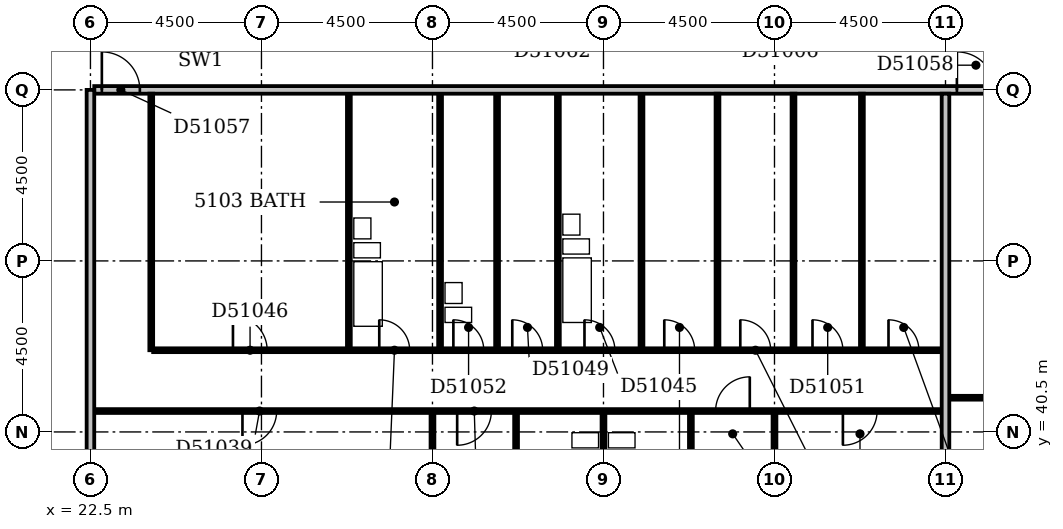
"""IFC4 building model, lengths in metres.
Left out: names, types, materials, properties, quantities, classifications, styles, units other than length and angle.
Written with IfcOpenShell. Run it as: python <this file> out.ifc"""

import sys

from ifc_helpers import new_model, si_unit, direction, frame, frame_2d, origin, place, context, subcontext, project, spatial, rectangle, extrude, element, fill, save


model = new_model("IFC4")
c1 = context("Model", 3, precision=1e-05, world=origin(), true_north=direction((0.0, 1.0)))
c2 = subcontext(c1, "Body", "Model", "MODEL_VIEW")
j1 = project(units=[si_unit("LENGTHUNIT", "METRE"), si_unit("PLANEANGLEUNIT", "RADIAN")], contexts=[c1])
p1 = place(None, origin())
s1 = spatial("IfcSite", under=j1, at=p1, CompositionType="ELEMENT")
p2 = place(p1, origin())
s2 = spatial("IfcBuilding", under=s1, at=p2, CompositionType="ELEMENT")
p3 = place(p2, frame((0.0, 0.0, 200.6)))
s3 = spatial("IfcBuildingStorey", under=s2, at=p3, CompositionType="ELEMENT", Elevation=200.6)
p4 = place(p3, frame((22.5, 36.45, 0.0), z_axis=(0.0, 0.0, 1.0), x_axis=(0.0, 1.0, 0.0)))
e1 = element("IfcWall", 1, at=p4, inside=s3, PredefinedType="PARTITIONING", context=c2, shape_type="SweptSolid", body=[
    extrude(rectangle(XDim=13.05, YDim=0.2, at=frame_2d((6.525, 0.0))), origin(), (0.0, 0.0, 1.0), 3.3),
])
p5 = place(p3, frame((31.5, 36.45, 0.0), z_axis=(0.0, 0.0, 1.0), x_axis=(0.0, 1.0, 0.0)))
e2 = element("IfcWall", 2, at=p5, inside=s3, PredefinedType="PARTITIONING", context=c2, shape_type="SweptSolid", body=[
    extrude(rectangle(XDim=4.55, YDim=0.1, at=frame_2d((2.275, 0.0))), origin(), (0.0, 0.0, 1.0), 3.3),
])
p6 = place(p3, frame((36.0, 36.45, 0.0), z_axis=(0.0, 0.0, 1.0), x_axis=(0.0, 1.0, 0.0)))
e3 = element("IfcWall", 3, at=p6, inside=s3, PredefinedType="PARTITIONING", context=c2, shape_type="SweptSolid", body=[
    extrude(rectangle(XDim=4.55, YDim=0.1, at=frame_2d((2.275, 0.0))), origin(), (0.0, 0.0, 1.0), 2.4),
])
p7 = place(p3, frame((40.5, 36.45, 0.0), z_axis=(0.0, 0.0, 1.0), x_axis=(0.0, 1.0, 0.0)))
e4 = element("IfcWall", 4, at=p7, inside=s3, PredefinedType="PARTITIONING", context=c2, shape_type="SweptSolid", body=[
    extrude(rectangle(XDim=4.55, YDim=0.1, at=frame_2d((2.275, 0.0))), origin(), (0.0, 0.0, 1.0), 3.3),
])
p8 = place(p3, frame((45.0, 36.45, 0.0), z_axis=(0.0, 0.0, 1.0), x_axis=(0.0, 1.0, 0.0)))
e5 = element("IfcWall", 5, at=p8, inside=s3, PredefinedType="PARTITIONING", context=c2, shape_type="SweptSolid", body=[
    extrude(rectangle(XDim=12.95, YDim=0.2, at=frame_2d((6.475, 0.0))), origin(), (0.0, 0.0, 1.0), 2.6),
])
p9 = place(p3, frame((33.7, 38.15, 0.0), z_axis=(0.0, 0.0, 1.0), x_axis=(0.0, 1.0, 0.0)))
e6 = element("IfcWall", 6, at=p9, inside=s3, PredefinedType="PLUMBINGWALL", context=c2, shape_type="SweptSolid", body=[
    extrude(rectangle(XDim=2.85, YDim=0.1, at=frame_2d((1.425, 0.0))), origin(), (0.0, 0.0, 1.0), 3.3),
])
p10 = place(p9, frame((1.05, 0.0, 0.0)))
e7 = element("IfcOpeningElement", 7, at=p10, cuts=e6, PredefinedType="OPENING", context=c2, shape_type="SweptSolid", body=[
    extrude(rectangle(XDim=0.8, YDim=2.1, at=frame_2d((0.4, 1.05))), frame((0.0, 0.062, 0.0), z_axis=(0.0, -1.0, 0.0), x_axis=(1.0, 0.0, 0.0)), (0.0, 0.0, 1.0), 0.124),
])
p11 = place(p3, frame((38.3, 38.15, 0.0), z_axis=(0.0, 0.0, 1.0), x_axis=(0.0, 1.0, 0.0)))
e8 = element("IfcWall", 8, at=p11, inside=s3, PredefinedType="PLUMBINGWALL", context=c2, shape_type="SweptSolid", body=[
    extrude(rectangle(XDim=2.85, YDim=0.1, at=frame_2d((1.425, 0.0))), origin(), (0.0, 0.0, 1.0), 3.3),
])
p12 = place(p11, frame((1.05, 0.0, 0.0)))
e9 = element("IfcOpeningElement", 9, at=p12, cuts=e8, PredefinedType="OPENING", context=c2, shape_type="SweptSolid", body=[
    extrude(rectangle(XDim=0.8, YDim=2.1, at=frame_2d((0.4, 1.05))), frame((0.0, 0.062, 0.0), z_axis=(0.0, -1.0, 0.0), x_axis=(1.0, 0.0, 0.0)), (0.0, 0.0, 1.0), 0.124),
])
p13 = place(p3, frame((22.6, 41.05, 0.0), z_axis=(0.0, 0.0, 1.0), x_axis=(1.0, 0.0, 0.0)))
e10 = element("IfcWall", 10, at=p13, inside=s3, PredefinedType="PARTITIONING", context=c2, shape_type="SweptSolid", body=[
    extrude(rectangle(XDim=22.3, YDim=0.1, at=frame_2d((11.15, 0.0))), origin(), (0.0, 0.0, 1.0), 3.3),
])
p14 = place(p13, frame((3.9, 0.0, 0.0)))
e11 = element("IfcOpeningElement", 11, at=p14, cuts=e10, PredefinedType="OPENING", context=c2, shape_type="SweptSolid", body=[
    extrude(rectangle(XDim=0.9, YDim=2.1, at=frame_2d((0.45, 1.05))), frame((0.0, 0.062, 0.0), z_axis=(0.0, -1.0, 0.0), x_axis=(1.0, 0.0, 0.0)), (0.0, 0.0, 1.0), 0.124),
])
p15 = place(p13, frame((9.55, 0.0, 0.0)))
e12 = element("IfcOpeningElement", 12, at=p15, cuts=e10, PredefinedType="OPENING", context=c2, shape_type="SweptSolid", body=[
    extrude(rectangle(XDim=0.9, YDim=2.1, at=frame_2d((0.45, 1.05))), frame((0.0, 0.062, 0.0), z_axis=(0.0, -1.0, 0.0), x_axis=(1.0, 0.0, 0.0)), (0.0, 0.0, 1.0), 0.124),
])
p16 = place(p13, frame((16.35, 0.0, 0.0)))
e13 = element("IfcOpeningElement", 13, at=p16, cuts=e10, PredefinedType="OPENING", context=c2, shape_type="SweptSolid", body=[
    extrude(rectangle(XDim=0.9, YDim=2.1, at=frame_2d((0.45, 1.05))), frame((0.0, 0.062, 0.0), z_axis=(0.0, -1.0, 0.0), x_axis=(1.0, 0.0, 0.0)), (0.0, 0.0, 1.0), 0.124),
])
p17 = place(p13, frame((19.7, 0.0, 0.0)))
e14 = element("IfcOpeningElement", 14, at=p17, cuts=e10, PredefinedType="OPENING", context=c2, shape_type="SweptSolid", body=[
    extrude(rectangle(XDim=0.9, YDim=2.1, at=frame_2d((0.45, 1.05))), frame((0.0, 0.062, 0.0), z_axis=(0.0, -1.0, 0.0), x_axis=(1.0, 0.0, 0.0)), (0.0, 0.0, 1.0), 0.124),
])
p18 = place(p3, frame((45.1, 41.4, 0.0), z_axis=(0.0, 0.0, 1.0), x_axis=(1.0, 0.0, 0.0)))
e15 = element("IfcWall", 15, at=p18, inside=s3, PredefinedType="PARTITIONING", context=c2, shape_type="SweptSolid", body=[
    extrude(rectangle(XDim=9.5, YDim=0.1, at=frame_2d((4.75, 0.0))), origin(), (0.0, 0.0, 1.0), 3.3),
])
p19 = place(p18, frame((3.95, 0.0, 0.0)))
e16 = element("IfcOpeningElement", 16, at=p19, cuts=e15, PredefinedType="OPENING", context=c2, shape_type="SweptSolid", body=[
    extrude(rectangle(XDim=0.9, YDim=2.1, at=frame_2d((0.45, 1.05))), frame((0.0, 0.062, 0.0), z_axis=(0.0, -1.0, 0.0), x_axis=(1.0, 0.0, 0.0)), (0.0, 0.0, 1.0), 0.124),
])
p20 = place(p3, frame((24.1, 42.65, 0.0), z_axis=(0.0, 0.0, 1.0), x_axis=(0.0, 1.0, 0.0)))
e17 = element("IfcWall", 17, at=p20, inside=s3, PredefinedType="PARTITIONING", context=c2, shape_type="SweptSolid", body=[
    extrude(rectangle(XDim=6.75, YDim=0.1, at=frame_2d((3.375, 0.0))), origin(), (0.0, 0.0, 1.0), 3.3),
])
p21 = place(p3, frame((24.15, 42.65, 0.0), z_axis=(0.0, 0.0, 1.0), x_axis=(1.0, 0.0, 0.0)))
e18 = element("IfcWall", 18, at=p21, inside=s3, PredefinedType="PARTITIONING", context=c2, shape_type="SweptSolid", body=[
    extrude(rectangle(XDim=20.75, YDim=0.1, at=frame_2d((10.375, 0.0))), origin(), (0.0, 0.0, 1.0), 3.3),
])
p22 = place(p21, frame((5.95, 0.0, 0.0)))
e19 = element("IfcOpeningElement", 19, at=p22, cuts=e18, PredefinedType="OPENING", context=c2, shape_type="SweptSolid", body=[
    extrude(rectangle(XDim=0.8, YDim=2.1, at=frame_2d((0.4, 1.05))), frame((0.0, 0.062, 0.0), z_axis=(0.0, -1.0, 0.0), x_axis=(1.0, 0.0, 0.0)), (0.0, 0.0, 1.0), 0.124),
])
p23 = place(p21, frame((11.35, 0.0, 0.0)))
e20 = element("IfcOpeningElement", 20, at=p23, cuts=e18, PredefinedType="OPENING", context=c2, shape_type="SweptSolid", body=[
    extrude(rectangle(XDim=0.8, YDim=2.1, at=frame_2d((0.4, 1.05))), frame((0.0, 0.062, 0.0), z_axis=(0.0, -1.0, 0.0), x_axis=(1.0, 0.0, 0.0)), (0.0, 0.0, 1.0), 0.124),
])
p24 = place(p21, frame((2.1, 0.0, 0.0)))
e21 = element("IfcOpeningElement", 21, at=p24, cuts=e18, PredefinedType="OPENING", context=c2, shape_type="SweptSolid", body=[
    extrude(rectangle(XDim=0.9, YDim=2.1, at=frame_2d((0.45, 1.05))), frame((0.0, 0.062, 0.0), z_axis=(0.0, -1.0, 0.0), x_axis=(1.0, 0.0, 0.0)), (0.0, 0.0, 1.0), 0.124),
])
p25 = place(p21, frame((19.35, 0.0, 0.0)))
e22 = element("IfcOpeningElement", 22, at=p25, cuts=e18, PredefinedType="OPENING", context=c2, shape_type="SweptSolid", body=[
    extrude(rectangle(XDim=0.8, YDim=2.1, at=frame_2d((0.4, 1.05))), frame((0.0, 0.062, 0.0), z_axis=(0.0, -1.0, 0.0), x_axis=(1.0, 0.0, 0.0)), (0.0, 0.0, 1.0), 0.124),
])
p26 = place(p21, frame((15.45, 0.0, 0.0)))
e23 = element("IfcOpeningElement", 23, at=p26, cuts=e18, PredefinedType="OPENING", context=c2, shape_type="SweptSolid", body=[
    extrude(rectangle(XDim=0.8, YDim=2.1, at=frame_2d((0.4, 1.05))), frame((0.0, 0.062, 0.0), z_axis=(0.0, -1.0, 0.0), x_axis=(1.0, 0.0, 0.0)), (0.0, 0.0, 1.0), 0.124),
])
p27 = place(p21, frame((9.45, 0.0, 0.0)))
e24 = element("IfcOpeningElement", 24, at=p27, cuts=e18, PredefinedType="OPENING", context=c2, shape_type="SweptSolid", body=[
    extrude(rectangle(XDim=0.8, YDim=2.1, at=frame_2d((0.4, 1.05))), frame((0.0, 0.062, 0.0), z_axis=(0.0, -1.0, 0.0), x_axis=(1.0, 0.0, 0.0)), (0.0, 0.0, 1.0), 0.124),
])
p28 = place(p21, frame((13.45, 0.0, 0.0)))
e25 = element("IfcOpeningElement", 25, at=p28, cuts=e18, PredefinedType="OPENING", context=c2, shape_type="SweptSolid", body=[
    extrude(rectangle(XDim=0.8, YDim=2.1, at=frame_2d((0.4, 1.05))), frame((0.0, 0.062, 0.0), z_axis=(0.0, -1.0, 0.0), x_axis=(1.0, 0.0, 0.0)), (0.0, 0.0, 1.0), 0.124),
])
p29 = place(p21, frame((17.35, 0.0, 0.0)))
e26 = element("IfcOpeningElement", 26, at=p29, cuts=e18, PredefinedType="OPENING", context=c2, shape_type="SweptSolid", body=[
    extrude(rectangle(XDim=0.8, YDim=2.1, at=frame_2d((0.4, 1.05))), frame((0.0, 0.062, 0.0), z_axis=(0.0, -1.0, 0.0), x_axis=(1.0, 0.0, 0.0)), (0.0, 0.0, 1.0), 0.124),
])
p30 = place(p21, frame((7.9, 0.0, 0.0)))
e27 = element("IfcOpeningElement", 27, at=p30, cuts=e18, PredefinedType="OPENING", context=c2, shape_type="SweptSolid", body=[
    extrude(rectangle(XDim=0.8, YDim=2.1, at=frame_2d((0.4, 1.05))), frame((0.0, 0.062, 0.0), z_axis=(0.0, -1.0, 0.0), x_axis=(1.0, 0.0, 0.0)), (0.0, 0.0, 1.0), 0.124),
])
for number, where, z_axis, x_axis in (
    (28, (29.3, 42.7, 0.0), (0.0, 0.0, 1.0), (0.0, 1.0, 0.0)),
    (29, (31.7, 42.7, 0.0), (0.0, 0.0, 1.0), (0.0, 1.0, 0.0)),
    (30, (33.2, 42.7, 0.0), (0.0, 0.0, 1.0), (0.0, 1.0, 0.0)),
    (31, (34.8, 42.7, 0.0), (0.0, 0.0, 1.0), (0.0, 1.0, 0.0)),
    (32, (37.0, 42.7, 0.0), (0.0, 0.0, 1.0), (0.0, 1.0, 0.0)),
):
    element("IfcWall", number, at=place(p3, frame(where, z_axis=z_axis, x_axis=x_axis)), inside=s3, PredefinedType="PLUMBINGWALL", context=c2, shape_type="SweptSolid", body=[
        extrude(rectangle(XDim=6.7, YDim=0.1, at=frame_2d((3.35, 0.0))), origin(), (0.0, 0.0, 1.0), 3.3),
    ])
for number, where, z_axis, x_axis in (
    (33, (39.0, 42.7, 0.0), (0.0, 0.0, 1.0), (0.0, 1.0, 0.0)),
    (34, (41.0, 42.7, 0.0), (0.0, 0.0, 1.0), (0.0, 1.0, 0.0)),
    (35, (42.8, 42.7, 0.0), (0.0, 0.0, 1.0), (0.0, 1.0, 0.0)),
):
    element("IfcWall", number, at=place(p3, frame(where, z_axis=z_axis, x_axis=x_axis)), inside=s3, PredefinedType="PARTITIONING", context=c2, shape_type="SweptSolid", body=[
        extrude(rectangle(XDim=6.7, YDim=0.1, at=frame_2d((3.35, 0.0))), origin(), (0.0, 0.0, 1.0), 3.3),
    ])
p31 = place(p3, frame((22.6, 49.5, 0.0), z_axis=(0.0, 0.0, 1.0), x_axis=(1.0, 0.0, 0.0)))
e36 = element("IfcWall", 36, at=p31, inside=s3, PredefinedType="PARTITIONING", context=c2, shape_type="SweptSolid", body=[
    extrude(rectangle(XDim=30.95, YDim=0.2, at=frame_2d((15.475, 0.0))), origin(), (0.0, 0.0, 1.0), 3.3),
])
p32 = place(p31, frame((0.2, 0.0, 0.0)))
e37 = element("IfcOpeningElement", 37, at=p32, cuts=e36, PredefinedType="OPENING", context=c2, shape_type="SweptSolid", body=[
    extrude(rectangle(XDim=1.0, YDim=2.1, at=frame_2d((0.5, 1.05))), frame((0.0, 0.112, 0.0), z_axis=(0.0, -1.0, 0.0), x_axis=(1.0, 0.0, 0.0)), (0.0, 0.0, 1.0), 0.224),
])
p33 = place(p31, frame((22.7, 0.0, 0.0)))
e38 = element("IfcOpeningElement", 38, at=p33, cuts=e36, PredefinedType="OPENING", context=c2, shape_type="SweptSolid", body=[
    extrude(rectangle(XDim=1.0, YDim=2.1, at=frame_2d((0.5, 1.05))), frame((0.0, 0.112, 0.0), z_axis=(0.0, -1.0, 0.0), x_axis=(1.0, 0.0, 0.0)), (0.0, 0.0, 1.0), 0.224),
])
p34 = place(p14, frame((0.9, 0.0, 0.0), z_axis=(0.0, 0.0, 1.0), x_axis=(-1.0, 0.0, 0.0)))
e39 = element("IfcDoor", 39, at=p34, inside=s3, OperationType="SINGLE_SWING_RIGHT", PredefinedType="DOOR", context=c2, shape_type="SweptSolid", body=[
    extrude(rectangle(XDim=0.9, YDim=2.1, at=frame_2d((0.45, 1.05))), frame((0.0, 0.025, 0.0), z_axis=(0.0, -1.0, 0.0), x_axis=(1.0, 0.0, 0.0)), (0.0, 0.0, 1.0), 0.05),
])
fill(e11, e39)
p35 = place(p15, frame((0.9, 0.0, 0.0), z_axis=(0.0, 0.0, 1.0), x_axis=(-1.0, 0.0, 0.0)))
e40 = element("IfcDoor", 40, at=p35, inside=s3, OperationType="SINGLE_SWING_RIGHT", PredefinedType="DOOR", context=c2, shape_type="SweptSolid", body=[
    extrude(rectangle(XDim=0.9, YDim=2.1, at=frame_2d((0.45, 1.05))), frame((0.0, 0.025, 0.0), z_axis=(0.0, -1.0, 0.0), x_axis=(1.0, 0.0, 0.0)), (0.0, 0.0, 1.0), 0.05),
])
fill(e12, e40)
p36 = place(p16, frame((0.9, 0.0, 0.0), z_axis=(0.0, 0.0, 1.0), x_axis=(-1.0, 0.0, 0.0)))
e41 = element("IfcDoor", 41, at=p36, inside=s3, OperationType="SINGLE_SWING_LEFT", PredefinedType="DOOR", context=c2, shape_type="SweptSolid", body=[
    extrude(rectangle(XDim=0.9, YDim=2.1, at=frame_2d((0.45, 1.05))), frame((0.0, 0.025, 0.0), z_axis=(0.0, -1.0, 0.0), x_axis=(1.0, 0.0, 0.0)), (0.0, 0.0, 1.0), 0.05),
])
fill(e13, e41)
p37 = place(p17, frame((0.9, 0.0, 0.0), z_axis=(0.0, 0.0, 1.0), x_axis=(-1.0, 0.0, 0.0)))
e42 = element("IfcDoor", 42, at=p37, inside=s3, OperationType="SINGLE_SWING_RIGHT", PredefinedType="DOOR", context=c2, shape_type="SweptSolid", body=[
    extrude(rectangle(XDim=0.9, YDim=2.1, at=frame_2d((0.45, 1.05))), frame((0.0, 0.025, 0.0), z_axis=(0.0, -1.0, 0.0), x_axis=(1.0, 0.0, 0.0)), (0.0, 0.0, 1.0), 0.05),
])
fill(e14, e42)
p38 = place(p22, origin())
e43 = element("IfcDoor", 43, at=p38, inside=s3, OperationType="SINGLE_SWING_LEFT", PredefinedType="DOOR", context=c2, shape_type="SweptSolid", body=[
    extrude(rectangle(XDim=0.8, YDim=2.1, at=frame_2d((0.4, 1.05))), frame((0.0, 0.025, 0.0), z_axis=(0.0, -1.0, 0.0), x_axis=(1.0, 0.0, 0.0)), (0.0, 0.0, 1.0), 0.05),
])
fill(e19, e43)
p39 = place(p23, origin())
e44 = element("IfcDoor", 44, at=p39, inside=s3, OperationType="SINGLE_SWING_LEFT", PredefinedType="DOOR", context=c2, shape_type="SweptSolid", body=[
    extrude(rectangle(XDim=0.8, YDim=2.1, at=frame_2d((0.4, 1.05))), frame((0.0, 0.025, 0.0), z_axis=(0.0, -1.0, 0.0), x_axis=(1.0, 0.0, 0.0)), (0.0, 0.0, 1.0), 0.05),
])
fill(e20, e44)
p40 = place(p24, origin())
e45 = element("IfcDoor", 45, at=p40, inside=s3, OperationType="SINGLE_SWING_LEFT", PredefinedType="DOOR", context=c2, shape_type="SweptSolid", body=[
    extrude(rectangle(XDim=0.9, YDim=2.1, at=frame_2d((0.45, 1.05))), frame((0.0, 0.025, 0.0), z_axis=(0.0, -1.0, 0.0), x_axis=(1.0, 0.0, 0.0)), (0.0, 0.0, 1.0), 0.05),
])
fill(e21, e45)
p41 = place(p25, origin())
e46 = element("IfcDoor", 46, at=p41, inside=s3, OperationType="SINGLE_SWING_LEFT", PredefinedType="DOOR", context=c2, shape_type="SweptSolid", body=[
    extrude(rectangle(XDim=0.8, YDim=2.1, at=frame_2d((0.4, 1.05))), frame((0.0, 0.025, 0.0), z_axis=(0.0, -1.0, 0.0), x_axis=(1.0, 0.0, 0.0)), (0.0, 0.0, 1.0), 0.05),
])
fill(e22, e46)
p42 = place(p26, origin())
e47 = element("IfcDoor", 47, at=p42, inside=s3, OperationType="SINGLE_SWING_LEFT", PredefinedType="DOOR", context=c2, shape_type="SweptSolid", body=[
    extrude(rectangle(XDim=0.8, YDim=2.1, at=frame_2d((0.4, 1.05))), frame((0.0, 0.025, 0.0), z_axis=(0.0, -1.0, 0.0), x_axis=(1.0, 0.0, 0.0)), (0.0, 0.0, 1.0), 0.05),
])
fill(e23, e47)
p43 = place(p27, origin())
e48 = element("IfcDoor", 48, at=p43, inside=s3, OperationType="SINGLE_SWING_LEFT", PredefinedType="DOOR", context=c2, shape_type="SweptSolid", body=[
    extrude(rectangle(XDim=0.8, YDim=2.1, at=frame_2d((0.4, 1.05))), frame((0.0, 0.025, 0.0), z_axis=(0.0, -1.0, 0.0), x_axis=(1.0, 0.0, 0.0)), (0.0, 0.0, 1.0), 0.05),
])
fill(e24, e48)
p44 = place(p28, origin())
e49 = element("IfcDoor", 49, at=p44, inside=s3, OperationType="SINGLE_SWING_LEFT", PredefinedType="DOOR", context=c2, shape_type="SweptSolid", body=[
    extrude(rectangle(XDim=0.8, YDim=2.1, at=frame_2d((0.4, 1.05))), frame((0.0, 0.025, 0.0), z_axis=(0.0, -1.0, 0.0), x_axis=(1.0, 0.0, 0.0)), (0.0, 0.0, 1.0), 0.05),
])
fill(e25, e49)
p45 = place(p29, origin())
e50 = element("IfcDoor", 50, at=p45, inside=s3, OperationType="SINGLE_SWING_LEFT", PredefinedType="DOOR", context=c2, shape_type="SweptSolid", body=[
    extrude(rectangle(XDim=0.8, YDim=2.1, at=frame_2d((0.4, 1.05))), frame((0.0, 0.025, 0.0), z_axis=(0.0, -1.0, 0.0), x_axis=(1.0, 0.0, 0.0)), (0.0, 0.0, 1.0), 0.05),
])
fill(e26, e50)
p46 = place(p30, origin())
e51 = element("IfcDoor", 51, at=p46, inside=s3, OperationType="SINGLE_SWING_LEFT", PredefinedType="DOOR", context=c2, shape_type="SweptSolid", body=[
    extrude(rectangle(XDim=0.8, YDim=2.1, at=frame_2d((0.4, 1.05))), frame((0.0, 0.025, 0.0), z_axis=(0.0, -1.0, 0.0), x_axis=(1.0, 0.0, 0.0)), (0.0, 0.0, 1.0), 0.05),
])
fill(e27, e51)
p47 = place(p32, origin())
e52 = element("IfcDoor", 52, at=p47, inside=s3, OperationType="SINGLE_SWING_LEFT", PredefinedType="DOOR", context=c2, shape_type="SweptSolid", body=[
    extrude(rectangle(XDim=1.0, YDim=2.1, at=frame_2d((0.5, 1.05))), frame((0.0, 0.025, 0.0), z_axis=(0.0, -1.0, 0.0), x_axis=(1.0, 0.0, 0.0)), (0.0, 0.0, 1.0), 0.05),
])
fill(e37, e52)
p48 = place(p33, origin())
e53 = element("IfcDoor", 53, at=p48, inside=s3, OperationType="SINGLE_SWING_LEFT", PredefinedType="DOOR", context=c2, shape_type="SweptSolid", body=[
    extrude(rectangle(XDim=1.0, YDim=2.1, at=frame_2d((0.5, 1.05))), frame((0.0, 0.025, 0.0), z_axis=(0.0, -1.0, 0.0), x_axis=(1.0, 0.0, 0.0)), (0.0, 0.0, 1.0), 0.05),
])
fill(e38, e53)
save(model, sys.argv[1])
